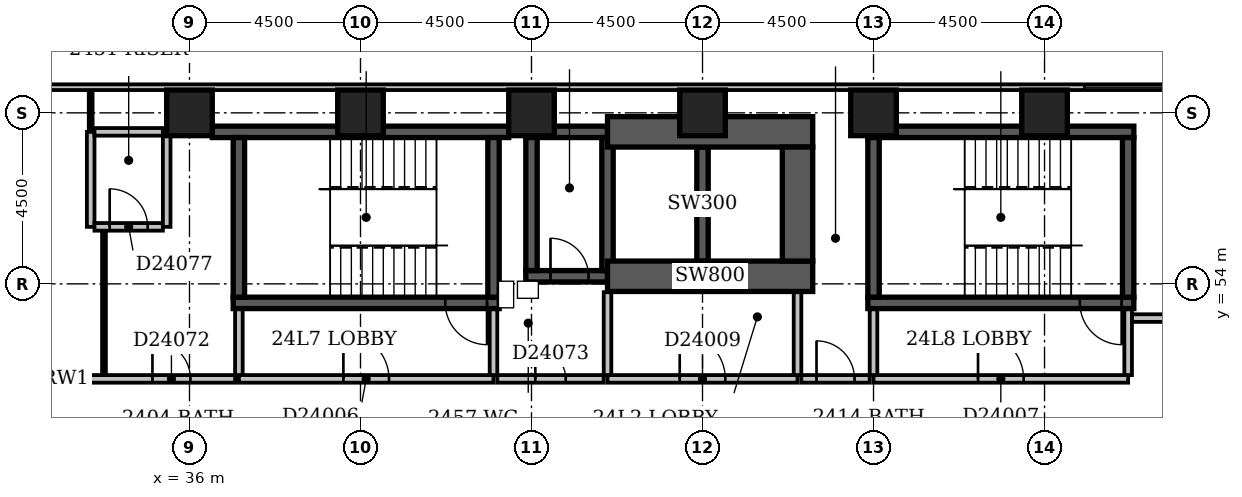
"""IFC4 building model, lengths in metres.
Left out: names, types, materials, properties, quantities, classifications, styles, units other than length and angle.
Written with IfcOpenShell. Run it as: python <this file> out.ifc"""

import sys

from ifc_helpers import new_model, si_unit, direction, frame, frame_2d, origin, origin_2d, place, context, subcontext, project, spatial, rectangle, extrude, element, fill, save


model = new_model("IFC4")
c1 = context("Model", 3, precision=1e-05, world=origin(), true_north=direction((0.0, 1.0)))
c2 = subcontext(c1, "Body", "Model", "MODEL_VIEW")
j1 = project(units=[si_unit("LENGTHUNIT", "METRE"), si_unit("PLANEANGLEUNIT", "RADIAN")], contexts=[c1])
p1 = place(None, origin())
s1 = spatial("IfcSite", under=j1, at=p1, CompositionType="ELEMENT")
p2 = place(p1, origin())
s2 = spatial("IfcBuilding", under=s1, at=p2, CompositionType="ELEMENT")
p3 = place(p2, frame((0.0, 0.0, 97.4)))
s3 = spatial("IfcBuildingStorey", under=s2, at=p3, CompositionType="ELEMENT", Elevation=97.4)
p4 = place(p3, frame((36.6, 58.0, -0.3), z_axis=(0.0, 0.0, 1.0), x_axis=(1.0, 0.0, 0.0)))
e1 = element("IfcWall", 1, at=p4, inside=s3, PredefinedType="SHEAR", context=c2, shape_type="SweptSolid", body=[
    extrude(rectangle(XDim=7.8, YDim=0.3, at=frame_2d((3.9, 0.0))), origin(), (0.0, 0.0, 1.0), 3.6),
])
p5 = place(p3, frame((37.15, 53.5, -0.3), z_axis=(0.0, 0.0, 1.0), x_axis=(1.0, 0.0, 0.0)))
e2 = element("IfcWall", 2, at=p5, inside=s3, PredefinedType="SHEAR", context=c2, shape_type="SweptSolid", body=[
    extrude(rectangle(XDim=7.0, YDim=0.3, at=frame_2d((3.5, 0.0))), origin(), (0.0, 0.0, 1.0), 3.6),
])
p6 = place(p5, frame((5.58, 0.0, 0.3)))
e3 = element("IfcOpeningElement", 3, at=p6, cuts=e2, PredefinedType="OPENING", context=c2, shape_type="SweptSolid", body=[
    extrude(rectangle(XDim=1.1, YDim=2.1, at=frame_2d((0.55, 1.05))), frame((0.0, 0.162, 0.0), z_axis=(0.0, -1.0, 0.0), x_axis=(1.0, 0.0, 0.0)), (0.0, 0.0, 1.0), 0.324),
])
for number, where, z_axis, x_axis in (
    (4, (37.3, 53.65, -0.3), (0.0, 0.0, 1.0), (0.0, 1.0, 0.0)),
    (5, (44.0, 53.65, -0.3), (0.0, 0.0, 1.0), (0.0, 1.0, 0.0)),
):
    element("IfcWall", number, at=place(p3, frame(where, z_axis=z_axis, x_axis=x_axis)), inside=s3, PredefinedType="SHEAR", context=c2, shape_type="SweptSolid", body=[
        extrude(rectangle(XDim=4.2, YDim=0.3, at=frame_2d((2.1, 0.0))), origin(), (0.0, 0.0, 1.0), 3.6),
    ])
p7 = place(p3, frame((44.85, 54.2, -0.3), z_axis=(0.0, 0.0, 1.0), x_axis=(1.0, 0.0, 0.0)))
e6 = element("IfcWall", 6, at=p7, inside=s3, PredefinedType="SHEAR", context=c2, shape_type="SweptSolid", body=[
    extrude(rectangle(XDim=2.15, YDim=0.3, at=frame_2d((1.075, 0.0))), origin(), (0.0, 0.0, 1.0), 3.6),
])
p8 = place(p7, frame((0.65, 0.0, 0.3)))
e7 = element("IfcOpeningElement", 7, at=p8, cuts=e6, PredefinedType="OPENING", context=c2, shape_type="SweptSolid", body=[
    extrude(rectangle(XDim=1.0, YDim=2.1, at=frame_2d((0.5, 1.05))), frame((0.0, 0.162, 0.0), z_axis=(0.0, -1.0, 0.0), x_axis=(1.0, 0.0, 0.0)), (0.0, 0.0, 1.0), 0.324),
])
p9 = place(p3, frame((44.85, 58.0, -0.3), z_axis=(0.0, 0.0, 1.0), x_axis=(1.0, 0.0, 0.0)))
e8 = element("IfcWall", 8, at=p9, inside=s3, PredefinedType="SHEAR", context=c2, shape_type="SweptSolid", body=[
    extrude(rectangle(XDim=2.15, YDim=0.3, at=frame_2d((1.075, 0.0))), origin(), (0.0, 0.0, 1.0), 3.6),
])
p10 = place(p3, frame((45.0, 54.35, -0.3), z_axis=(0.0, 0.0, 1.0), x_axis=(0.0, 1.0, 0.0)))
e9 = element("IfcWall", 9, at=p10, inside=s3, PredefinedType="SHEAR", context=c2, shape_type="SweptSolid", body=[
    extrude(rectangle(XDim=3.5, YDim=0.3, at=frame_2d((1.75, 0.0))), origin(), (0.0, 0.0, 1.0), 3.6),
])
p11 = place(p3, frame((47.0, 54.2, -0.3), z_axis=(0.0, 0.0, 1.0), x_axis=(1.0, 0.0, 0.0)))
e10 = element("IfcWall", 10, at=p11, inside=s3, PredefinedType="SHEAR", context=c2, shape_type="SweptSolid", body=[
    extrude(rectangle(XDim=5.4, YDim=0.8, at=frame_2d((2.7, 0.0))), origin(), (0.0, 0.0, 1.0), 3.6),
])
p12 = place(p3, frame((47.0, 54.35, -0.3), z_axis=(0.0, 0.0, 1.0), x_axis=(0.0, 1.0, 0.0)))
e11 = element("IfcWall", 11, at=p12, inside=s3, PredefinedType="SHEAR", context=c2, shape_type="SweptSolid", body=[
    extrude(rectangle(XDim=3.5, YDim=0.3, at=frame_2d((1.75, 0.0))), origin(), (0.0, 0.0, 1.0), 3.6),
])
p13 = place(p3, frame((47.0, 58.0, -0.3), z_axis=(0.0, 0.0, 1.0), x_axis=(1.0, 0.0, 0.0)))
e12 = element("IfcWall", 12, at=p13, inside=s3, PredefinedType="SHEAR", context=c2, shape_type="SweptSolid", body=[
    extrude(rectangle(XDim=5.4, YDim=0.8, at=frame_2d((2.7, 0.0))), origin(), (0.0, 0.0, 1.0), 3.6),
])
p14 = place(p3, frame((49.5, 54.6, -0.3), z_axis=(0.0, 0.0, 1.0), x_axis=(0.0, 1.0, 0.0)))
e13 = element("IfcWall", 13, at=p14, inside=s3, PredefinedType="SHEAR", context=c2, shape_type="SweptSolid", body=[
    extrude(rectangle(XDim=3.0, YDim=0.3, at=frame_2d((1.5, 0.0))), origin(), (0.0, 0.0, 1.0), 3.6),
])
p15 = place(p3, frame((52.0, 54.6, -0.3), z_axis=(0.0, 0.0, 1.0), x_axis=(0.0, 1.0, 0.0)))
e14 = element("IfcWall", 14, at=p15, inside=s3, PredefinedType="SHEAR", context=c2, shape_type="SweptSolid", body=[
    extrude(rectangle(XDim=3.0, YDim=0.8, at=frame_2d((1.5, 0.0))), origin(), (0.0, 0.0, 1.0), 3.6),
])
p16 = place(p3, frame((53.85, 53.5, -0.3), z_axis=(0.0, 0.0, 1.0), x_axis=(1.0, 0.0, 0.0)))
e15 = element("IfcWall", 15, at=p16, inside=s3, PredefinedType="SHEAR", context=c2, shape_type="SweptSolid", body=[
    extrude(rectangle(XDim=7.0, YDim=0.3, at=frame_2d((3.5, 0.0))), origin(), (0.0, 0.0, 1.0), 3.6),
])
p17 = place(p16, frame((5.58, 0.0, 0.3)))
e16 = element("IfcOpeningElement", 16, at=p17, cuts=e15, PredefinedType="OPENING", context=c2, shape_type="SweptSolid", body=[
    extrude(rectangle(XDim=1.1, YDim=2.1, at=frame_2d((0.55, 1.05))), frame((0.0, 0.162, 0.0), z_axis=(0.0, -1.0, 0.0), x_axis=(1.0, 0.0, 0.0)), (0.0, 0.0, 1.0), 0.324),
])
p18 = place(p3, frame((53.85, 58.0, -0.3), z_axis=(0.0, 0.0, 1.0), x_axis=(1.0, 0.0, 0.0)))
e17 = element("IfcWall", 17, at=p18, inside=s3, PredefinedType="SHEAR", context=c2, shape_type="SweptSolid", body=[
    extrude(rectangle(XDim=7.0, YDim=0.3, at=frame_2d((3.5, 0.0))), origin(), (0.0, 0.0, 1.0), 3.6),
])
for number, where, z_axis, x_axis in (
    (18, (54.0, 53.65, -0.3), (0.0, 0.0, 1.0), (0.0, 1.0, 0.0)),
    (19, (60.7, 53.65, -0.3), (0.0, 0.0, 1.0), (0.0, 1.0, 0.0)),
):
    element("IfcWall", number, at=place(p3, frame(where, z_axis=z_axis, x_axis=x_axis)), inside=s3, PredefinedType="SHEAR", context=c2, shape_type="SweptSolid", body=[
        extrude(rectangle(XDim=4.2, YDim=0.3, at=frame_2d((2.1, 0.0))), origin(), (0.0, 0.0, 1.0), 3.6),
    ])
for number, where, z_axis, x_axis in (
    (20, (36.0, 58.5, -0.3), (0.0, 0.0, 1.0), (1.0, 0.0, 0.0)),
    (21, (40.5, 58.5, -0.3), (0.0, 0.0, 1.0), (1.0, 0.0, 0.0)),
    (22, (45.0, 58.5, -0.3), (0.0, 0.0, 1.0), (1.0, 0.0, 0.0)),
    (23, (49.5, 58.5, -0.3), (0.0, 0.0, 1.0), (1.0, 0.0, 0.0)),
    (24, (54.0, 58.5, -0.3), (0.0, 0.0, 1.0), (1.0, 0.0, 0.0)),
    (25, (58.5, 58.5, -0.3), (0.0, 0.0, 1.0), (1.0, 0.0, 0.0)),
):
    element("IfcColumn", number, at=place(p3, frame(where, z_axis=z_axis, x_axis=x_axis)), inside=s3, PredefinedType="COLUMN", context=c2, shape_type="SweptSolid", body=[
        extrude(rectangle(XDim=1.2, YDim=1.2, at=origin_2d()), origin(), (0.0, 0.0, 1.0), 3.6),
    ])
p19 = place(p3, frame((68.1, 59.175, 0.0), z_axis=(0.0, 0.0, 1.0), x_axis=(-1.0, 0.0, 0.0)))
e26 = element("IfcWall", 26, at=p19, inside=s3, PredefinedType="STANDARD", context=c2, shape_type="SweptSolid", body=[
    extrude(rectangle(XDim=68.85, YDim=0.15, at=frame_2d((34.425, 0.0))), origin(), (0.0, 0.0, 1.0), 2.7),
])
p20 = place(p19, frame((1.474, 0.0, 0.6)))
e27 = element("IfcOpeningElement", 27, at=p20, cuts=e26, PredefinedType="OPENING", context=c2, shape_type="SweptSolid", body=[
    extrude(rectangle(XDim=1.2, YDim=1.8, at=frame_2d((0.6, 0.9))), frame((0.0, 0.087, 0.0), z_axis=(0.0, -1.0, 0.0), x_axis=(1.0, 0.0, 0.0)), (0.0, 0.0, 1.0), 0.174),
])
p21 = place(p19, frame((6.15, 0.0, 0.6)))
e28 = element("IfcOpeningElement", 28, at=p21, cuts=e26, PredefinedType="OPENING", context=c2, shape_type="SweptSolid", body=[
    extrude(rectangle(XDim=2.4, YDim=1.8, at=frame_2d((1.2, 0.9))), frame((0.0, 0.087, 0.0), z_axis=(0.0, -1.0, 0.0), x_axis=(1.0, 0.0, 0.0)), (0.0, 0.0, 1.0), 0.174),
])
p22 = place(p3, frame((47.0, 51.5, 0.0), z_axis=(0.0, 0.0, 1.0), x_axis=(1.0, 0.0, 0.0)))
e29 = element("IfcWall", 29, at=p22, inside=s3, PredefinedType="PARTITIONING", context=c2, shape_type="SweptSolid", body=[
    extrude(rectangle(XDim=5.0, YDim=0.2, at=frame_2d((2.5, 0.0))), origin(), (0.0, 0.0, 1.0), 3.3),
])
p23 = place(p22, frame((1.9, 0.0, 0.0)))
e30 = element("IfcOpeningElement", 30, at=p23, cuts=e29, PredefinedType="OPENING", context=c2, shape_type="SweptSolid", body=[
    extrude(rectangle(XDim=1.2, YDim=2.1, at=frame_2d((0.6, 1.05))), frame((0.0, 0.112, 0.0), z_axis=(0.0, -1.0, 0.0), x_axis=(1.0, 0.0, 0.0)), (0.0, 0.0, 1.0), 0.224),
])
for number, where, z_axis, x_axis in (
    (31, (52.0, 51.6, 0.0), (0.0, 0.0, 1.0), (0.0, 1.0, 0.0)),
    (32, (47.0, 51.6, 0.0), (0.0, 0.0, 1.0), (0.0, 1.0, 0.0)),
):
    element("IfcWall", number, at=place(p3, frame(where, z_axis=z_axis, x_axis=x_axis)), inside=s3, PredefinedType="PARTITIONING", context=c2, shape_type="SweptSolid", body=[
        extrude(rectangle(XDim=2.18, YDim=0.2, at=frame_2d((1.09, 0.0))), origin(), (0.0, 0.0, 1.0), 3.3),
    ])
p24 = place(p3, frame((37.3, 51.5, 0.0), z_axis=(0.0, 0.0, 1.0), x_axis=(1.0, 0.0, 0.0)))
e33 = element("IfcWall", 33, at=p24, inside=s3, PredefinedType="PARTITIONING", context=c2, shape_type="SweptSolid", body=[
    extrude(rectangle(XDim=6.7, YDim=0.2, at=frame_2d((3.35, 0.0))), origin(), (0.0, 0.0, 1.0), 3.3),
])
p25 = place(p24, frame((2.75, 0.0, 0.0)))
e34 = element("IfcOpeningElement", 34, at=p25, cuts=e33, PredefinedType="OPENING", context=c2, shape_type="SweptSolid", body=[
    extrude(rectangle(XDim=1.2, YDim=2.1, at=frame_2d((0.6, 1.05))), frame((0.0, 0.112, 0.0), z_axis=(0.0, -1.0, 0.0), x_axis=(1.0, 0.0, 0.0)), (0.0, 0.0, 1.0), 0.224),
])
for number, where, z_axis, x_axis in (
    (35, (44.0, 51.6, 0.0), (0.0, 0.0, 1.0), (0.0, 1.0, 0.0)),
    (36, (37.3, 51.6, 0.0), (0.0, 0.0, 1.0), (0.0, 1.0, 0.0)),
):
    element("IfcWall", number, at=place(p3, frame(where, z_axis=z_axis, x_axis=x_axis)), inside=s3, PredefinedType="PARTITIONING", context=c2, shape_type="SweptSolid", body=[
        extrude(rectangle(XDim=1.73, YDim=0.2, at=frame_2d((0.865, 0.0))), origin(), (0.0, 0.0, 1.0), 3.3),
    ])
p26 = place(p3, frame((54.0, 51.5, 0.0), z_axis=(0.0, 0.0, 1.0), x_axis=(1.0, 0.0, 0.0)))
e37 = element("IfcWall", 37, at=p26, inside=s3, PredefinedType="PARTITIONING", context=c2, shape_type="SweptSolid", body=[
    extrude(rectangle(XDim=6.7, YDim=0.2, at=frame_2d((3.35, 0.0))), origin(), (0.0, 0.0, 1.0), 3.3),
])
p27 = place(p26, frame((2.75, 0.0, 0.0)))
e38 = element("IfcOpeningElement", 38, at=p27, cuts=e37, PredefinedType="OPENING", context=c2, shape_type="SweptSolid", body=[
    extrude(rectangle(XDim=1.2, YDim=2.1, at=frame_2d((0.6, 1.05))), frame((0.0, 0.112, 0.0), z_axis=(0.0, -1.0, 0.0), x_axis=(1.0, 0.0, 0.0)), (0.0, 0.0, 1.0), 0.224),
])
p28 = place(p3, frame((60.7, 51.6, 0.0), z_axis=(0.0, 0.0, 1.0), x_axis=(0.0, 1.0, 0.0)))
e39 = element("IfcWall", 39, at=p28, inside=s3, PredefinedType="PARTITIONING", context=c2, shape_type="SweptSolid", body=[
    extrude(rectangle(XDim=1.73, YDim=0.2, at=frame_2d((0.865, 0.0))), origin(), (0.0, 0.0, 1.0), 3.3),
])
p29 = place(p3, frame((54.0, 51.6, 0.0), z_axis=(0.0, 0.0, 1.0), x_axis=(0.0, 1.0, 0.0)))
e40 = element("IfcWall", 40, at=p29, inside=s3, PredefinedType="PARTITIONING", context=c2, shape_type="SweptSolid", body=[
    extrude(rectangle(XDim=1.73, YDim=0.2, at=frame_2d((0.865, 0.0))), origin(), (0.0, 0.0, 1.0), 2.6),
])
p30 = place(p3, frame((27.9, 51.5, 0.0), z_axis=(0.0, 0.0, 1.0), x_axis=(1.0, 0.0, 0.0)))
e41 = element("IfcWall", 41, at=p30, inside=s3, PredefinedType="PARTITIONING", context=c2, shape_type="SweptSolid", body=[
    extrude(rectangle(XDim=9.3, YDim=0.2, at=frame_2d((4.65, 0.0))), origin(), (0.0, 0.0, 1.0), 3.3),
])
p31 = place(p30, frame((2.375, 0.0, 0.0)))
e42 = element("IfcOpeningElement", 42, at=p31, cuts=e41, PredefinedType="OPENING", context=c2, shape_type="SweptSolid", body=[
    extrude(rectangle(XDim=1.0, YDim=2.1, at=frame_2d((0.5, 1.05))), frame((0.0, 0.112, 0.0), z_axis=(0.0, -1.0, 0.0), x_axis=(1.0, 0.0, 0.0)), (0.0, 0.0, 1.0), 0.224),
])
p32 = place(p30, frame((7.125, 0.0, 0.0)))
e43 = element("IfcOpeningElement", 43, at=p32, cuts=e41, PredefinedType="OPENING", context=c2, shape_type="SweptSolid", body=[
    extrude(rectangle(XDim=1.0, YDim=2.1, at=frame_2d((0.5, 1.05))), frame((0.0, 0.112, 0.0), z_axis=(0.0, -1.0, 0.0), x_axis=(1.0, 0.0, 0.0)), (0.0, 0.0, 1.0), 0.224),
])
p33 = place(p3, frame((44.1, 51.5, 0.0), z_axis=(0.0, 0.0, 1.0), x_axis=(1.0, 0.0, 0.0)))
e44 = element("IfcWall", 44, at=p33, inside=s3, PredefinedType="PARTITIONING", context=c2, shape_type="SweptSolid", body=[
    extrude(rectangle(XDim=2.8, YDim=0.2, at=frame_2d((1.4, 0.0))), origin(), (0.0, 0.0, 1.0), 3.3),
])
p34 = place(p33, frame((1.0, 0.0, 0.0)))
e45 = element("IfcOpeningElement", 45, at=p34, cuts=e44, PredefinedType="OPENING", context=c2, shape_type="SweptSolid", body=[
    extrude(rectangle(XDim=0.8, YDim=2.1, at=frame_2d((0.4, 1.05))), frame((0.0, 0.112, 0.0), z_axis=(0.0, -1.0, 0.0), x_axis=(1.0, 0.0, 0.0)), (0.0, 0.0, 1.0), 0.224),
])
p35 = place(p3, frame((52.1, 51.5, 0.0), z_axis=(0.0, 0.0, 1.0), x_axis=(1.0, 0.0, 0.0)))
e46 = element("IfcWall", 46, at=p35, inside=s3, PredefinedType="PARTITIONING", context=c2, shape_type="SweptSolid", body=[
    extrude(rectangle(XDim=1.8, YDim=0.2, at=frame_2d((0.9, 0.0))), origin(), (0.0, 0.0, 1.0), 3.3),
])
p36 = place(p35, frame((0.4, 0.0, 0.0)))
e47 = element("IfcOpeningElement", 47, at=p36, cuts=e46, PredefinedType="OPENING", context=c2, shape_type="SweptSolid", body=[
    extrude(rectangle(XDim=1.0, YDim=2.1, at=frame_2d((0.5, 1.05))), frame((0.0, 0.112, 0.0), z_axis=(0.0, -1.0, 0.0), x_axis=(1.0, 0.0, 0.0)), (0.0, 0.0, 1.0), 0.224),
])
p37 = place(p3, frame((33.75, 51.6, 0.0), z_axis=(0.0, 0.0, 1.0), x_axis=(0.0, 1.0, 0.0)))
e48 = element("IfcWall", 48, at=p37, inside=s3, PredefinedType="PARTITIONING", context=c2, shape_type="SweptSolid", body=[
    extrude(rectangle(XDim=3.8, YDim=0.1, at=frame_2d((1.9, 0.0))), origin(), (0.0, 0.0, 1.0), 3.3),
])
p38 = place(p3, frame((60.8, 53.1, 0.0), z_axis=(0.0, 0.0, 1.0), x_axis=(1.0, 0.0, 0.0)))
e49 = element("IfcWall", 49, at=p38, inside=s3, PredefinedType="PARTITIONING", context=c2, shape_type="SweptSolid", body=[
    extrude(rectangle(XDim=7.3, YDim=0.2, at=frame_2d((3.65, 0.0))), origin(), (0.0, 0.0, 1.0), 3.3),
])
p39 = place(p38, frame((2.85, 0.0, 0.0)))
e50 = element("IfcOpeningElement", 50, at=p39, cuts=e49, PredefinedType="OPENING", context=c2, shape_type="SweptSolid", body=[
    extrude(rectangle(XDim=0.9, YDim=2.1, at=frame_2d((0.45, 1.05))), frame((0.0, 0.112, 0.0), z_axis=(0.0, -1.0, 0.0), x_axis=(1.0, 0.0, 0.0)), (0.0, 0.0, 1.0), 0.224),
])
p40 = place(p3, frame((33.4, 55.5, 0.0), z_axis=(0.0, 0.0, 1.0), x_axis=(0.0, 1.0, 0.0)))
e51 = element("IfcWall", 51, at=p40, inside=s3, PredefinedType="PARTITIONING", context=c2, shape_type="SweptSolid", body=[
    extrude(rectangle(XDim=2.5, YDim=0.2, at=frame_2d((1.25, 0.0))), origin(), (0.0, 0.0, 1.0), 3.3),
])
p41 = place(p3, frame((33.5, 55.5, 0.0), z_axis=(0.0, 0.0, 1.0), x_axis=(1.0, 0.0, 0.0)))
e52 = element("IfcWall", 52, at=p41, inside=s3, PredefinedType="PARTITIONING", context=c2, shape_type="SweptSolid", body=[
    extrude(rectangle(XDim=1.8, YDim=0.2, at=frame_2d((0.9, 0.0))), origin(), (0.0, 0.0, 1.0), 3.3),
])
p42 = place(p41, frame((0.4, 0.0, 0.0)))
e53 = element("IfcOpeningElement", 53, at=p42, cuts=e52, PredefinedType="OPENING", context=c2, shape_type="SweptSolid", body=[
    extrude(rectangle(XDim=1.0, YDim=2.1, at=frame_2d((0.5, 1.05))), frame((0.0, 0.112, 0.0), z_axis=(0.0, -1.0, 0.0), x_axis=(1.0, 0.0, 0.0)), (0.0, 0.0, 1.0), 0.224),
])
p43 = place(p3, frame((35.4, 55.5, 0.0), z_axis=(0.0, 0.0, 1.0), x_axis=(0.0, 1.0, 0.0)))
e54 = element("IfcWall", 54, at=p43, inside=s3, PredefinedType="PARTITIONING", context=c2, shape_type="SweptSolid", body=[
    extrude(rectangle(XDim=2.5, YDim=0.2, at=frame_2d((1.25, 0.0))), origin(), (0.0, 0.0, 1.0), 2.4),
])
p44 = place(p3, frame((33.4, 58.0, 0.0), z_axis=(0.0, 0.0, 1.0), x_axis=(0.0, 1.0, 0.0)))
e55 = element("IfcWall", 55, at=p44, inside=s3, PredefinedType="PARTITIONING", context=c2, shape_type="SweptSolid", body=[
    extrude(rectangle(XDim=1.1, YDim=0.1, at=frame_2d((0.55, 0.0))), origin(), (0.0, 0.0, 1.0), 3.3),
])
p45 = place(p3, frame((33.5, 58.0, 0.0), z_axis=(0.0, 0.0, 1.0), x_axis=(1.0, 0.0, 0.0)))
e56 = element("IfcWall", 56, at=p45, inside=s3, PredefinedType="PARTITIONING", context=c2, shape_type="SweptSolid", body=[
    extrude(rectangle(XDim=1.8, YDim=0.2, at=frame_2d((0.9, 0.0))), origin(), (0.0, 0.0, 1.0), 3.3),
])
p46 = place(p21, origin())
e57 = element("IfcWindow", 57, at=p46, inside=s3, PartitioningType="SINGLE_PANEL", PredefinedType="WINDOW", context=c2, shape_type="SweptSolid", body=[
    extrude(rectangle(XDim=2.4, YDim=1.8, at=frame_2d((1.2, 0.9))), frame((0.0, 0.03, 0.0), z_axis=(0.0, -1.0, 0.0), x_axis=(1.0, 0.0, 0.0)), (0.0, 0.0, 1.0), 0.06),
])
fill(e28, e57)
p47 = place(p25, origin())
e58 = element("IfcDoor", 58, at=p47, inside=s3, OperationType="SINGLE_SWING_LEFT", PredefinedType="DOOR", context=c2, shape_type="SweptSolid", body=[
    extrude(rectangle(XDim=1.2, YDim=2.1, at=frame_2d((0.6, 1.05))), frame((0.0, 0.025, 0.0), z_axis=(0.0, -1.0, 0.0), x_axis=(1.0, 0.0, 0.0)), (0.0, 0.0, 1.0), 0.05),
])
fill(e34, e58)
p48 = place(p27, origin())
e59 = element("IfcDoor", 59, at=p48, inside=s3, OperationType="SINGLE_SWING_LEFT", PredefinedType="DOOR", context=c2, shape_type="SweptSolid", body=[
    extrude(rectangle(XDim=1.2, YDim=2.1, at=frame_2d((0.6, 1.05))), frame((0.0, 0.025, 0.0), z_axis=(0.0, -1.0, 0.0), x_axis=(1.0, 0.0, 0.0)), (0.0, 0.0, 1.0), 0.05),
])
fill(e38, e59)
p49 = place(p23, origin())
e60 = element("IfcDoor", 60, at=p49, inside=s3, OperationType="SINGLE_SWING_LEFT", PredefinedType="DOOR", context=c2, shape_type="SweptSolid", body=[
    extrude(rectangle(XDim=1.2, YDim=2.1, at=frame_2d((0.6, 1.05))), frame((0.0, 0.025, 0.0), z_axis=(0.0, -1.0, 0.0), x_axis=(1.0, 0.0, 0.0)), (0.0, 0.0, 1.0), 0.05),
])
fill(e30, e60)
p50 = place(p8, origin())
e61 = element("IfcDoor", 61, at=p50, inside=s3, OperationType="SINGLE_SWING_LEFT", PredefinedType="DOOR", context=c2, shape_type="SweptSolid", body=[
    extrude(rectangle(XDim=1.0, YDim=2.1, at=frame_2d((0.5, 1.05))), frame((0.0, 0.025, 0.0), z_axis=(0.0, -1.0, 0.0), x_axis=(1.0, 0.0, 0.0)), (0.0, 0.0, 1.0), 0.05),
])
fill(e7, e61)
p51 = place(p6, origin())
e62 = element("IfcDoor", 62, at=p51, inside=s3, OperationType="SINGLE_SWING_RIGHT", PredefinedType="DOOR", context=c2, shape_type="SweptSolid", body=[
    extrude(rectangle(XDim=1.1, YDim=2.1, at=frame_2d((0.55, 1.05))), frame((0.0, 0.025, 0.0), z_axis=(0.0, -1.0, 0.0), x_axis=(1.0, 0.0, 0.0)), (0.0, 0.0, 1.0), 0.05),
])
fill(e3, e62)
p52 = place(p17, origin())
e63 = element("IfcDoor", 63, at=p52, inside=s3, OperationType="SINGLE_SWING_RIGHT", PredefinedType="DOOR", context=c2, shape_type="SweptSolid", body=[
    extrude(rectangle(XDim=1.1, YDim=2.1, at=frame_2d((0.55, 1.05))), frame((0.0, 0.025, 0.0), z_axis=(0.0, -1.0, 0.0), x_axis=(1.0, 0.0, 0.0)), (0.0, 0.0, 1.0), 0.05),
])
fill(e16, e63)
p53 = place(p32, origin())
e64 = element("IfcDoor", 64, at=p53, inside=s3, OperationType="SINGLE_SWING_LEFT", PredefinedType="DOOR", context=c2, shape_type="SweptSolid", body=[
    extrude(rectangle(XDim=1.0, YDim=2.1, at=frame_2d((0.5, 1.05))), frame((0.0, 0.025, 0.0), z_axis=(0.0, -1.0, 0.0), x_axis=(1.0, 0.0, 0.0)), (0.0, 0.0, 1.0), 0.05),
])
fill(e43, e64)
p54 = place(p34, origin())
e65 = element("IfcDoor", 65, at=p54, inside=s3, OperationType="SINGLE_SWING_LEFT", PredefinedType="DOOR", context=c2, shape_type="SweptSolid", body=[
    extrude(rectangle(XDim=0.8, YDim=2.1, at=frame_2d((0.4, 1.05))), frame((0.0, 0.025, 0.0), z_axis=(0.0, -1.0, 0.0), x_axis=(1.0, 0.0, 0.0)), (0.0, 0.0, 1.0), 0.05),
])
fill(e45, e65)
p55 = place(p36, origin())
e66 = element("IfcDoor", 66, at=p55, inside=s3, OperationType="SINGLE_SWING_LEFT", PredefinedType="DOOR", context=c2, shape_type="SweptSolid", body=[
    extrude(rectangle(XDim=1.0, YDim=2.1, at=frame_2d((0.5, 1.05))), frame((0.0, 0.025, 0.0), z_axis=(0.0, -1.0, 0.0), x_axis=(1.0, 0.0, 0.0)), (0.0, 0.0, 1.0), 0.05),
])
fill(e47, e66)
p56 = place(p42, origin())
e67 = element("IfcDoor", 67, at=p56, inside=s3, OperationType="SINGLE_SWING_LEFT", PredefinedType="DOOR", context=c2, shape_type="SweptSolid", body=[
    extrude(rectangle(XDim=1.0, YDim=2.1, at=frame_2d((0.5, 1.05))), frame((0.0, 0.025, 0.0), z_axis=(0.0, -1.0, 0.0), x_axis=(1.0, 0.0, 0.0)), (0.0, 0.0, 1.0), 0.05),
])
fill(e53, e67)
save(model, sys.argv[1])
